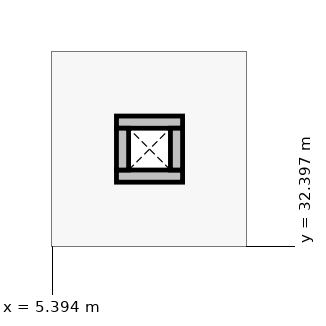
"""IFC4 building model, lengths in metres.
Left out: names, types, materials, properties, quantities, classifications, styles, units other than length and angle.
Written with IfcOpenShell. Run it as: python <this file> out.ifc"""

import sys

from ifc_helpers import new_model, si_unit, direction, frame, frame_2d, origin, place, context, subcontext, project, spatial, rectangle, extrude, element, save


model = new_model("IFC4")
c1 = context("Model", 3, precision=1e-05, world=origin(), true_north=direction((0.0, 1.0)))
c2 = subcontext(c1, "Body", "Model", "MODEL_VIEW")
j1 = project(units=[si_unit("LENGTHUNIT", "METRE"), si_unit("PLANEANGLEUNIT", "RADIAN")], contexts=[c1])
p1 = place(None, origin())
s1 = spatial("IfcSite", under=j1, at=p1, CompositionType="ELEMENT")
p2 = place(p1, origin())
s2 = spatial("IfcBuilding", under=s1, at=p2, CompositionType="ELEMENT")
p3 = place(p2, frame((0.0, 0.0, 4.8)))
s3 = spatial("IfcBuildingStorey", under=s2, at=p3, CompositionType="ELEMENT", Elevation=4.8)
for number, where, z_axis, x_axis in (
    (1, (6.24, 33.32, 0.0), (0.0, 0.0, 1.0), (1.0, 0.0, 0.0)),
    (2, (6.24, 34.03, 0.0), (0.0, 0.0, 1.0), (1.0, 0.0, 0.0)),
):
    element("IfcWall", number, at=place(p3, frame(where, z_axis=z_axis, x_axis=x_axis)), inside=s3, PredefinedType="PARTITIONING", context=c2, shape_type="SweptSolid", body=[
        extrude(rectangle(XDim=0.87, YDim=0.16, at=frame_2d((0.435, 0.0))), origin(), (0.0, 0.0, 1.0), 3.35),
    ])
for number, where, z_axis, x_axis in (
    (3, (6.32, 33.4, 0.0), (0.0, 0.0, 1.0), (0.0, 1.0, 0.0)),
    (4, (7.03, 33.4, 0.0), (0.0, 0.0, 1.0), (0.0, 1.0, 0.0)),
):
    element("IfcWall", number, at=place(p3, frame(where, z_axis=z_axis, x_axis=x_axis)), inside=s3, PredefinedType="PARTITIONING", context=c2, shape_type="SweptSolid", body=[
        extrude(rectangle(XDim=0.55, YDim=0.16, at=frame_2d((0.275, 0.0))), origin(), (0.0, 0.0, 1.0), 3.35),
    ])
save(model, sys.argv[1])
